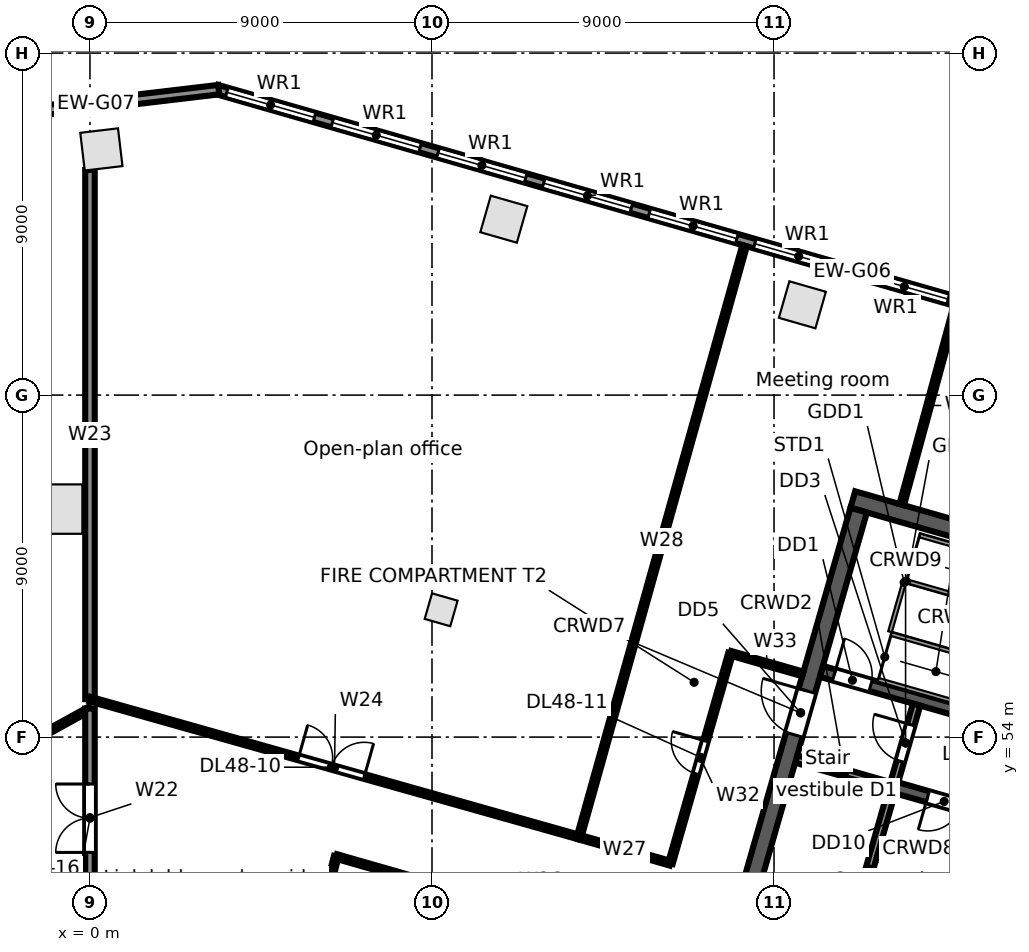
"""IFC4 building model, lengths in metres.
Left out: names, types, materials, properties, quantities, classifications, styles, units other than length and angle.
Written with IfcOpenShell. Run it as: python <this file> out.ifc"""

import sys

from ifc_helpers import new_model, si_unit, direction, frame, frame_2d, origin, origin_2d, place, context, subcontext, project, spatial, rectangle, extrude, element, fill, save


model = new_model("IFC4")
c1 = context("Model", 3, precision=1e-05, world=origin(), true_north=direction((0.0, 1.0)))
c2 = subcontext(c1, "Body", "Model", "MODEL_VIEW")
j1 = project(units=[si_unit("LENGTHUNIT", "METRE"), si_unit("PLANEANGLEUNIT", "RADIAN")], contexts=[c1])
p1 = place(None, origin())
s1 = spatial("IfcSite", under=j1, at=p1, CompositionType="ELEMENT")
p2 = place(p1, origin())
s2 = spatial("IfcBuilding", under=s1, at=p2, CompositionType="ELEMENT")
p3 = place(p2, frame((0.0, 0.0, 223.1)))
s3 = spatial("IfcBuildingStorey", under=s2, at=p3, CompositionType="ELEMENT", Elevation=223.1)
for number, where, z_axis, x_axis in (
    (1, (18.746, 65.376, 0.0), (0.0, 0.0, 1.0), (-0.961, 0.276, 0.0)),
    (2, (10.89, 67.629, 0.0), (0.0, 0.0, 1.0), (-0.961, 0.276, 0.0)),
    (3, (0.3, 69.464, 0.0), (0.0, 0.0, 1.0), (-0.993, -0.118, 0.0)),
):
    element("IfcColumn", number, at=place(p3, frame(where, z_axis=z_axis, x_axis=x_axis)), inside=s3, PredefinedType="COLUMN", context=c2, shape_type="SweptSolid", body=[
        extrude(rectangle(XDim=1.0, YDim=1.0, at=origin_2d()), origin(), (0.0, 0.0, 1.0), 3.9),
    ])
p4 = place(p3, frame((-0.85, 60.0, 0.0), z_axis=(0.0, 0.0, 1.0), x_axis=(0.0, 1.0, 0.0)))
e4 = element("IfcColumn", 4, at=p4, inside=s3, PredefinedType="COLUMN", context=c2, shape_type="SweptSolid", body=[
    extrude(rectangle(XDim=1.3, YDim=1.3, at=origin_2d()), origin(), (0.0, 0.0, 1.0), 3.9),
])
p5 = place(p3, frame((9.241, 57.35, 0.0), z_axis=(0.0, 0.0, 1.0), x_axis=(0.961261695938, -0.275637355817, 0.0)))
e5 = element("IfcColumn", 5, at=p5, inside=s3, PredefinedType="COLUMN", context=c2, shape_type="SweptSolid", body=[
    extrude(rectangle(XDim=0.7, YDim=0.7, at=origin_2d()), origin(), (0.0, 0.0, 1.0), 3.9),
])
p6 = place(p3, frame((3.34, 71.042, 0.0), z_axis=(0.0, 0.0, 1.0), x_axis=(0.96126179431, -0.275637012753, 0.0)))
e6 = element("IfcWall", 6, at=p6, inside=s3, PredefinedType="STANDARD", context=c2, shape_type="SweptSolid", body=[
    extrude(rectangle(XDim=34.779, YDim=0.25, at=frame_2d((17.39, 0.0))), origin(), (0.0, 0.0, 1.0), 3.62),
])
p7 = place(p6, frame((32.071, 0.0, 0.8)))
e7 = element("IfcOpeningElement", 7, at=p7, cuts=e6, PredefinedType="OPENING", context=c2, shape_type="SweptSolid", body=[
    extrude(rectangle(XDim=2.4, YDim=2.2, at=frame_2d((1.2, 1.1))), frame((0.0, 0.135, 0.0), z_axis=(0.0, -1.0, 0.0), x_axis=(1.0, 0.0, 0.0)), (0.0, 0.0, 1.0), 0.27),
])
p8 = place(p6, frame((29.18, 0.0, 0.8)))
e8 = element("IfcOpeningElement", 8, at=p8, cuts=e6, PredefinedType="OPENING", context=c2, shape_type="SweptSolid", body=[
    extrude(rectangle(XDim=2.4, YDim=2.2, at=frame_2d((1.2, 1.1))), frame((0.0, 0.135, 0.0), z_axis=(0.0, -1.0, 0.0), x_axis=(1.0, 0.0, 0.0)), (0.0, 0.0, 1.0), 0.27),
])
p9 = place(p6, frame((26.289, 0.0, 0.8)))
e9 = element("IfcOpeningElement", 9, at=p9, cuts=e6, PredefinedType="OPENING", context=c2, shape_type="SweptSolid", body=[
    extrude(rectangle(XDim=2.4, YDim=2.2, at=frame_2d((1.2, 1.1))), frame((0.0, 0.135, 0.0), z_axis=(0.0, -1.0, 0.0), x_axis=(1.0, 0.0, 0.0)), (0.0, 0.0, 1.0), 0.27),
])
p10 = place(p6, frame((23.398, 0.0, 0.8)))
e10 = element("IfcOpeningElement", 10, at=p10, cuts=e6, PredefinedType="OPENING", context=c2, shape_type="SweptSolid", body=[
    extrude(rectangle(XDim=2.4, YDim=2.2, at=frame_2d((1.2, 1.1))), frame((0.0, 0.135, 0.0), z_axis=(0.0, -1.0, 0.0), x_axis=(1.0, 0.0, 0.0)), (0.0, 0.0, 1.0), 0.27),
])
p11 = place(p6, frame((20.508, 0.0, 0.8)))
e11 = element("IfcOpeningElement", 11, at=p11, cuts=e6, PredefinedType="OPENING", context=c2, shape_type="SweptSolid", body=[
    extrude(rectangle(XDim=2.4, YDim=2.2, at=frame_2d((1.2, 1.1))), frame((0.0, 0.135, 0.0), z_axis=(0.0, -1.0, 0.0), x_axis=(1.0, 0.0, 0.0)), (0.0, 0.0, 1.0), 0.27),
])
p12 = place(p6, frame((17.616, 0.0, 0.8)))
e12 = element("IfcOpeningElement", 12, at=p12, cuts=e6, PredefinedType="OPENING", context=c2, shape_type="SweptSolid", body=[
    extrude(rectangle(XDim=2.4, YDim=2.2, at=frame_2d((1.2, 1.1))), frame((0.0, 0.135, 0.0), z_axis=(0.0, -1.0, 0.0), x_axis=(1.0, 0.0, 0.0)), (0.0, 0.0, 1.0), 0.27),
])
p13 = place(p6, frame((14.726, 0.0, 0.8)))
e13 = element("IfcOpeningElement", 13, at=p13, cuts=e6, PredefinedType="OPENING", context=c2, shape_type="SweptSolid", body=[
    extrude(rectangle(XDim=2.4, YDim=2.2, at=frame_2d((1.2, 1.1))), frame((0.0, 0.135, 0.0), z_axis=(0.0, -1.0, 0.0), x_axis=(1.0, 0.0, 0.0)), (0.0, 0.0, 1.0), 0.27),
])
p14 = place(p6, frame((11.834, 0.0, 0.8)))
e14 = element("IfcOpeningElement", 14, at=p14, cuts=e6, PredefinedType="OPENING", context=c2, shape_type="SweptSolid", body=[
    extrude(rectangle(XDim=2.4, YDim=2.2, at=frame_2d((1.2, 1.1))), frame((0.0, 0.135, 0.0), z_axis=(0.0, -1.0, 0.0), x_axis=(1.0, 0.0, 0.0)), (0.0, 0.0, 1.0), 0.27),
])
p15 = place(p6, frame((8.944, 0.0, 0.8)))
e15 = element("IfcOpeningElement", 15, at=p15, cuts=e6, PredefinedType="OPENING", context=c2, shape_type="SweptSolid", body=[
    extrude(rectangle(XDim=2.4, YDim=2.2, at=frame_2d((1.2, 1.1))), frame((0.0, 0.135, 0.0), z_axis=(0.0, -1.0, 0.0), x_axis=(1.0, 0.0, 0.0)), (0.0, 0.0, 1.0), 0.27),
])
p16 = place(p6, frame((6.052, 0.0, 0.8)))
e16 = element("IfcOpeningElement", 16, at=p16, cuts=e6, PredefinedType="OPENING", context=c2, shape_type="SweptSolid", body=[
    extrude(rectangle(XDim=2.4, YDim=2.2, at=frame_2d((1.2, 1.1))), frame((0.0, 0.135, 0.0), z_axis=(0.0, -1.0, 0.0), x_axis=(1.0, 0.0, 0.0)), (0.0, 0.0, 1.0), 0.27),
])
p17 = place(p6, frame((3.162, 0.0, 0.8)))
e17 = element("IfcOpeningElement", 17, at=p17, cuts=e6, PredefinedType="OPENING", context=c2, shape_type="SweptSolid", body=[
    extrude(rectangle(XDim=2.4, YDim=2.2, at=frame_2d((1.2, 1.1))), frame((0.0, 0.135, 0.0), z_axis=(0.0, -1.0, 0.0), x_axis=(1.0, 0.0, 0.0)), (0.0, 0.0, 1.0), 0.27),
])
p18 = place(p6, frame((0.271, 0.0, 0.8)))
e18 = element("IfcOpeningElement", 18, at=p18, cuts=e6, PredefinedType="OPENING", context=c2, shape_type="SweptSolid", body=[
    extrude(rectangle(XDim=2.4, YDim=2.2, at=frame_2d((1.2, 1.1))), frame((0.0, 0.135, 0.0), z_axis=(0.0, -1.0, 0.0), x_axis=(1.0, 0.0, 0.0)), (0.0, 0.0, 1.0), 0.27),
])
p19 = place(p3, frame((-3.071, 70.273, 0.0), z_axis=(0.0, 0.0, 1.0), x_axis=(0.993064524962, 0.11757061394, 0.0)))
e19 = element("IfcWall", 19, at=p19, inside=s3, PredefinedType="STANDARD", context=c2, shape_type="SweptSolid", body=[
    extrude(rectangle(XDim=6.506, YDim=0.25, at=frame_2d((3.253, 0.0))), origin(), (0.0, 0.0, 1.0), 3.62),
])
p20 = place(p3, frame((18.583, 53.423, 0.0), z_axis=(0.0, 0.0, 1.0), x_axis=(0.961259287968, -0.275645753268, 0.0)))
e20 = element("IfcWall", 20, at=p20, inside=s3, PredefinedType="SOLIDWALL", context=c2, shape_type="SweptSolid", body=[
    extrude(rectangle(XDim=2.65, YDim=0.2, at=frame_2d((1.325, 0.0))), origin(), (0.0, 0.0, 1.0), 3.62),
])
p21 = place(p3, frame((21.131, 52.692, 0.0), z_axis=(0.0, 0.0, 1.0), x_axis=(0.961261488075, -0.275638080722, 0.0)))
e21 = element("IfcWall", 21, at=p21, inside=s3, PredefinedType="SOLIDWALL", context=c2, shape_type="SweptSolid", body=[
    extrude(rectangle(XDim=5.45, YDim=0.3, at=frame_2d((2.725, 0.0))), origin(), (0.0, 0.0, 1.0), 3.62),
])
p22 = place(p21, frame((0.95, 0.0, 0.0)))
e22 = element("IfcOpeningElement", 22, at=p22, cuts=e21, PredefinedType="OPENING", context=c2, shape_type="SweptSolid", body=[
    extrude(rectangle(XDim=0.9, YDim=2.1, at=frame_2d((0.45, 1.05))), frame((0.0, 0.16, 0.0), z_axis=(0.0, -1.0, 0.0), x_axis=(1.0, 0.0, 0.0)), (0.0, 0.0, 1.0), 0.32),
])
p23 = place(p21, frame((3.75, 0.0, 0.0)))
e23 = element("IfcOpeningElement", 23, at=p23, cuts=e21, PredefinedType="OPENING", context=c2, shape_type="SweptSolid", body=[
    extrude(rectangle(XDim=0.9, YDim=2.1, at=frame_2d((0.45, 1.05))), frame((0.0, 0.16, 0.0), z_axis=(0.0, -1.0, 0.0), x_axis=(1.0, 0.0, 0.0)), (0.0, 0.0, 1.0), 0.32),
])
p24 = place(p3, frame((19.245, 55.73, 0.0), z_axis=(0.0, 0.0, 1.0), x_axis=(0.961263007877, -0.275632780503, 0.0)))
e24 = element("IfcWall", 24, at=p24, inside=s3, PredefinedType="SOLIDWALL", context=c2, shape_type="SweptSolid", body=[
    extrude(rectangle(XDim=7.25, YDim=0.3, at=frame_2d((3.625, 0.0))), origin(), (0.0, 0.0, 1.0), 3.62),
])
p25 = place(p24, frame((0.35, 0.0, 0.0)))
e25 = element("IfcOpeningElement", 25, at=p25, cuts=e24, PredefinedType="OPENING", context=c2, shape_type="SweptSolid", body=[
    extrude(rectangle(XDim=1.0, YDim=2.1, at=frame_2d((0.5, 1.05))), frame((0.0, 0.16, 0.0), z_axis=(0.0, -1.0, 0.0), x_axis=(1.0, 0.0, 0.0)), (0.0, 0.0, 1.0), 0.32),
])
p26 = place(p3, frame((20.073, 60.252, 0.0), z_axis=(0.0, 0.0, 1.0), x_axis=(0.96126248289, -0.275634611374, 0.0)))
e26 = element("IfcWall", 26, at=p26, inside=s3, PredefinedType="SOLIDWALL", context=c2, shape_type="SweptSolid", body=[
    extrude(rectangle(XDim=9.0, YDim=0.45, at=frame_2d((4.5, 0.0))), origin(), (0.0, 0.0, 1.0), 3.62),
])
p27 = place(p3, frame((17.168, 49.303, 0.0), z_axis=(0.0, 0.0, 1.0), x_axis=(0.275638974822, 0.961261231695, 0.0)))
e27 = element("IfcWall", 27, at=p27, inside=s3, PredefinedType="SOLIDWALL", context=c2, shape_type="SweptSolid", body=[
    extrude(rectangle(XDim=11.1, YDim=0.45, at=frame_2d((5.55, 0.0))), origin(), (0.0, 0.0, 1.0), 3.62),
])
p28 = place(p27, frame((4.95, 0.0, 0.0)))
e28 = element("IfcOpeningElement", 28, at=p28, cuts=e27, PredefinedType="OPENING", context=c2, shape_type="SweptSolid", body=[
    extrude(rectangle(XDim=1.2, YDim=2.1, at=frame_2d((0.6, 1.05))), frame((0.0, 0.235, 0.0), z_axis=(0.0, -1.0, 0.0), x_axis=(1.0, 0.0, 0.0)), (0.0, 0.0, 1.0), 0.47),
])
p29 = place(p3, frame((19.932, 48.511, 0.0), z_axis=(0.0, 0.0, 1.0), x_axis=(0.275642273411, 0.961260285827, 0.0)))
e29 = element("IfcWall", 29, at=p29, inside=s3, PredefinedType="SOLIDWALL", context=c2, shape_type="SweptSolid", body=[
    extrude(rectangle(XDim=4.2, YDim=0.2, at=frame_2d((2.1, 0.0))), origin(), (0.0, 0.0, 1.0), 3.62),
])
p30 = place(p3, frame((21.172, 52.837, 0.0), z_axis=(0.0, 0.0, 1.0), x_axis=(0.275657676022, 0.961255868981, 0.0)))
e30 = element("IfcWall", 30, at=p30, inside=s3, PredefinedType="PARTITIONING", context=c2, shape_type="SweptSolid", body=[
    extrude(rectangle(XDim=2.1, YDim=0.2, at=frame_2d((1.05, 0.0))), origin(), (0.0, 0.0, 1.0), 3.62),
])
p31 = place(p30, frame((0.55, 0.0, 0.0)))
e31 = element("IfcOpeningElement", 31, at=p31, cuts=e30, PredefinedType="OPENING", context=c2, shape_type="SweptSolid", body=[
    extrude(rectangle(XDim=1.0, YDim=2.1, at=frame_2d((0.5, 1.05))), frame((0.0, 0.11, 0.0), z_axis=(0.0, -1.0, 0.0), x_axis=(1.0, 0.0, 0.0)), (0.0, 0.0, 1.0), 0.22),
])
p32 = place(p3, frame((22.623, 47.739, 0.0), z_axis=(0.0, 0.0, 1.0), x_axis=(0.275642273411, 0.961260285827, 0.0)))
e32 = element("IfcWall", 32, at=p32, inside=s3, PredefinedType="PARTITIONING", context=c2, shape_type="SweptSolid", body=[
    extrude(rectangle(XDim=4.2, YDim=0.2, at=frame_2d((2.1, 0.0))), origin(), (0.0, 0.0, 1.0), 3.62),
])
p33 = place(p3, frame((-6.053, 51.405, 0.0), z_axis=(0.0, 0.0, 1.0), x_axis=(0.875247434681, 0.483675436718, 0.0)))
e33 = element("IfcWall", 33, at=p33, inside=s3, PredefinedType="PARTITIONING", context=c2, shape_type="SweptSolid", body=[
    extrude(rectangle(XDim=6.916, YDim=0.125, at=frame_2d((3.458, 0.0))), origin(), (0.0, 0.0, 1.0), 2.8),
])
p34 = place(p33, frame((2.45, 0.0, 0.0)))
e34 = element("IfcOpeningElement", 34, at=p34, cuts=e33, PredefinedType="OPENING", context=c2, shape_type="SweptSolid", body=[
    extrude(rectangle(XDim=1.8, YDim=2.1, at=frame_2d((0.9, 1.05))), frame((0.0, 0.073, 0.0), z_axis=(0.0, -1.0, 0.0), x_axis=(1.0, 0.0, 0.0)), (0.0, 0.0, 1.0), 0.145),
])
p35 = place(p3, frame((0.0, 49.015, 0.0), z_axis=(0.0, 0.0, 1.0), x_axis=(0.0, 1.0, 0.0)))
e35 = element("IfcWall", 35, at=p35, inside=s3, PredefinedType="PARTITIONING", context=c2, shape_type="SweptSolid", body=[
    extrude(rectangle(XDim=5.735, YDim=0.25, at=frame_2d((2.868, 0.0))), origin(), (0.0, 0.0, 1.0), 3.62),
])
p36 = place(p35, frame((1.95, 0.0, 0.0)))
e36 = element("IfcOpeningElement", 36, at=p36, cuts=e35, PredefinedType="OPENING", context=c2, shape_type="SweptSolid", body=[
    extrude(rectangle(XDim=1.8, YDim=2.1, at=frame_2d((0.9, 1.05))), frame((0.0, 0.135, 0.0), z_axis=(0.0, -1.0, 0.0), x_axis=(1.0, 0.0, 0.0)), (0.0, 0.0, 1.0), 0.27),
])
p37 = place(p3, frame((0.0, 55.0, 0.0), z_axis=(0.0, 0.0, 1.0), x_axis=(0.0, 1.0, 0.0)))
e37 = element("IfcWall", 37, at=p37, inside=s3, PredefinedType="PARTITIONING", context=c2, shape_type="SweptSolid", body=[
    extrude(rectangle(XDim=13.925, YDim=0.25, at=frame_2d((6.962, 0.0))), origin(), (0.0, 0.0, 1.0), 2.8),
])
p38 = place(p3, frame((0.0, 55.0, 0.0), z_axis=(0.0, 0.0, 1.0), x_axis=(0.962402937884, -0.271625818271, 0.0)))
e38 = element("IfcWall", 38, at=p38, inside=s3, PredefinedType="PARTITIONING", context=c2, shape_type="SweptSolid", body=[
    extrude(rectangle(XDim=13.372, YDim=0.125, at=frame_2d((6.686, 0.0))), origin(), (0.0, 0.0, 1.0), 2.8),
])
p39 = place(p38, frame((5.7, 0.0, 0.0)))
e39 = element("IfcOpeningElement", 39, at=p39, cuts=e38, PredefinedType="OPENING", context=c2, shape_type="SweptSolid", body=[
    extrude(rectangle(XDim=1.8, YDim=2.1, at=frame_2d((0.9, 1.05))), frame((0.0, 0.073, 0.0), z_axis=(0.0, -1.0, 0.0), x_axis=(1.0, 0.0, 0.0)), (0.0, 0.0, 1.0), 0.145),
])
p40 = place(p3, frame((5.364, 46.592, 0.0), z_axis=(0.0, 0.0, 1.0), x_axis=(0.253446952203, 0.967349286669, 0.0)))
e40 = element("IfcWall", 40, at=p40, inside=s3, PredefinedType="PARTITIONING", context=c2, shape_type="SweptSolid", body=[
    extrude(rectangle(XDim=4.411, YDim=0.125, at=frame_2d((2.206, 0.0))), origin(), (0.0, 0.0, 1.0), 2.988),
])
p41 = place(p3, frame((6.482, 50.859, 0.0), z_axis=(0.0, 0.0, 1.0), x_axis=(0.961261196169, -0.275639098713, 0.0)))
e41 = element("IfcWall", 41, at=p41, inside=s3, PredefinedType="PARTITIONING", context=c2, shape_type="SweptSolid", body=[
    extrude(rectangle(XDim=8.5, YDim=0.125, at=frame_2d((4.25, 0.0))), origin(), (0.0, 0.0, 1.0), 2.8),
])
p42 = place(p41, frame((3.7, 0.0, 0.0)))
e42 = element("IfcOpeningElement", 42, at=p42, cuts=e41, PredefinedType="OPENING", context=c2, shape_type="SweptSolid", body=[
    extrude(rectangle(XDim=0.9, YDim=2.1, at=frame_2d((0.45, 1.05))), frame((0.0, 0.073, 0.0), z_axis=(0.0, -1.0, 0.0), x_axis=(1.0, 0.0, 0.0)), (0.0, 0.0, 1.0), 0.145),
])
p43 = place(p3, frame((12.869, 51.368, 0.0), z_axis=(0.0, 0.0, 1.0), x_axis=(0.961302601161, -0.275494662382, 0.0)))
e43 = element("IfcWall", 43, at=p43, inside=s3, PredefinedType="PARTITIONING", context=c2, shape_type="SweptSolid", body=[
    extrude(rectangle(XDim=2.501, YDim=0.125, at=frame_2d((1.25, 0.0))), origin(), (0.0, 0.0, 1.0), 3.62),
])
p44 = place(p3, frame((12.869, 51.368, 0.0), z_axis=(0.0, 0.0, 1.0), x_axis=(0.269547555311, 0.962987079574, 0.0)))
e44 = element("IfcWall", 44, at=p44, inside=s3, PredefinedType="PARTITIONING", context=c2, shape_type="SweptSolid", body=[
    extrude(rectangle(XDim=16.161, YDim=0.125, at=frame_2d((8.081, 0.0))), origin(), (0.0, 0.0, 1.0), 2.792),
])
p45 = place(p3, frame((15.273, 50.679, 0.0), z_axis=(0.0, 0.0, 1.0), x_axis=(0.275494973205, 0.961302512084, 0.0)))
e45 = element("IfcWall", 45, at=p45, inside=s3, PredefinedType="PARTITIONING", context=c2, shape_type="SweptSolid", body=[
    extrude(rectangle(XDim=5.75, YDim=0.125, at=frame_2d((2.875, 0.0))), origin(), (0.0, 0.0, 1.0), 2.8),
])
p46 = place(p45, frame((2.45, 0.0, 0.0)))
e46 = element("IfcOpeningElement", 46, at=p46, cuts=e45, PredefinedType="OPENING", context=c2, shape_type="SweptSolid", body=[
    extrude(rectangle(XDim=0.9, YDim=2.1, at=frame_2d((0.45, 1.05))), frame((0.0, 0.073, 0.0), z_axis=(0.0, -1.0, 0.0), x_axis=(1.0, 0.0, 0.0)), (0.0, 0.0, 1.0), 0.145),
])
p47 = place(p3, frame((16.857, 56.206, 0.0), z_axis=(0.0, 0.0, 1.0), x_axis=(0.961383985066, -0.275210525341, 0.0)))
e47 = element("IfcWall", 47, at=p47, inside=s3, PredefinedType="PARTITIONING", context=c2, shape_type="SweptSolid", body=[
    extrude(rectangle(XDim=1.977, YDim=0.125, at=frame_2d((0.988, 0.0))), origin(), (0.0, 0.0, 1.0), 3.62),
])
p48 = place(p3, frame((21.36, 60.117, 0.0), z_axis=(0.0, 0.0, 1.0), x_axis=(0.263151767798, 0.964754449124, 0.0)))
e48 = element("IfcWall", 48, at=p48, inside=s3, PredefinedType="PARTITIONING", context=c2, shape_type="SweptSolid", body=[
    extrude(rectangle(XDim=5.411, YDim=0.125, at=frame_2d((2.705, 0.0))), origin(), (0.0, 0.0, 1.0), 3.0),
])
p49 = place(p12, origin())
e49 = element("IfcWindow", 49, at=p49, inside=s3, PartitioningType="SINGLE_PANEL", PredefinedType="WINDOW", context=c2, shape_type="SweptSolid", body=[
    extrude(rectangle(XDim=2.4, YDim=2.2, at=frame_2d((1.2, 1.1))), frame((0.0, 0.03, 0.0), z_axis=(0.0, -1.0, 0.0), x_axis=(1.0, 0.0, 0.0)), (0.0, 0.0, 1.0), 0.06),
])
fill(e12, e49)
p50 = place(p13, origin())
e50 = element("IfcWindow", 50, at=p50, inside=s3, PartitioningType="SINGLE_PANEL", PredefinedType="WINDOW", context=c2, shape_type="SweptSolid", body=[
    extrude(rectangle(XDim=2.4, YDim=2.2, at=frame_2d((1.2, 1.1))), frame((0.0, 0.03, 0.0), z_axis=(0.0, -1.0, 0.0), x_axis=(1.0, 0.0, 0.0)), (0.0, 0.0, 1.0), 0.06),
])
fill(e13, e50)
p51 = place(p14, origin())
e51 = element("IfcWindow", 51, at=p51, inside=s3, PartitioningType="SINGLE_PANEL", PredefinedType="WINDOW", context=c2, shape_type="SweptSolid", body=[
    extrude(rectangle(XDim=2.4, YDim=2.2, at=frame_2d((1.2, 1.1))), frame((0.0, 0.03, 0.0), z_axis=(0.0, -1.0, 0.0), x_axis=(1.0, 0.0, 0.0)), (0.0, 0.0, 1.0), 0.06),
])
fill(e14, e51)
p52 = place(p15, origin())
e52 = element("IfcWindow", 52, at=p52, inside=s3, PartitioningType="SINGLE_PANEL", PredefinedType="WINDOW", context=c2, shape_type="SweptSolid", body=[
    extrude(rectangle(XDim=2.4, YDim=2.2, at=frame_2d((1.2, 1.1))), frame((0.0, 0.03, 0.0), z_axis=(0.0, -1.0, 0.0), x_axis=(1.0, 0.0, 0.0)), (0.0, 0.0, 1.0), 0.06),
])
fill(e15, e52)
p53 = place(p16, origin())
e53 = element("IfcWindow", 53, at=p53, inside=s3, PartitioningType="SINGLE_PANEL", PredefinedType="WINDOW", context=c2, shape_type="SweptSolid", body=[
    extrude(rectangle(XDim=2.4, YDim=2.2, at=frame_2d((1.2, 1.1))), frame((0.0, 0.03, 0.0), z_axis=(0.0, -1.0, 0.0), x_axis=(1.0, 0.0, 0.0)), (0.0, 0.0, 1.0), 0.06),
])
fill(e16, e53)
p54 = place(p17, origin())
e54 = element("IfcWindow", 54, at=p54, inside=s3, PartitioningType="SINGLE_PANEL", PredefinedType="WINDOW", context=c2, shape_type="SweptSolid", body=[
    extrude(rectangle(XDim=2.4, YDim=2.2, at=frame_2d((1.2, 1.1))), frame((0.0, 0.03, 0.0), z_axis=(0.0, -1.0, 0.0), x_axis=(1.0, 0.0, 0.0)), (0.0, 0.0, 1.0), 0.06),
])
fill(e17, e54)
p55 = place(p18, origin())
e55 = element("IfcWindow", 55, at=p55, inside=s3, PartitioningType="SINGLE_PANEL", PredefinedType="WINDOW", context=c2, shape_type="SweptSolid", body=[
    extrude(rectangle(XDim=2.4, YDim=2.2, at=frame_2d((1.2, 1.1))), frame((0.0, 0.03, 0.0), z_axis=(0.0, -1.0, 0.0), x_axis=(1.0, 0.0, 0.0)), (0.0, 0.0, 1.0), 0.06),
])
fill(e18, e55)
p56 = place(p25, origin())
e56 = element("IfcDoor", 56, at=p56, inside=s3, OperationType="SINGLE_SWING_LEFT", PredefinedType="DOOR", context=c2, shape_type="SweptSolid", body=[
    extrude(rectangle(XDim=1.0, YDim=2.1, at=frame_2d((0.5, 1.05))), frame((0.0, 0.025, 0.0), z_axis=(0.0, -1.0, 0.0), x_axis=(1.0, 0.0, 0.0)), (0.0, 0.0, 1.0), 0.05),
])
fill(e25, e56)
p57 = place(p31, origin())
e57 = element("IfcDoor", 57, at=p57, inside=s3, OperationType="SINGLE_SWING_RIGHT", PredefinedType="DOOR", context=c2, shape_type="SweptSolid", body=[
    extrude(rectangle(XDim=1.0, YDim=2.1, at=frame_2d((0.5, 1.05))), frame((0.0, 0.025, 0.0), z_axis=(0.0, -1.0, 0.0), x_axis=(1.0, 0.0, 0.0)), (0.0, 0.0, 1.0), 0.05),
])
fill(e31, e57)
p58 = place(p28, origin())
e58 = element("IfcDoor", 58, at=p58, inside=s3, OperationType="SINGLE_SWING_RIGHT", PredefinedType="DOOR", context=c2, shape_type="SweptSolid", body=[
    extrude(rectangle(XDim=1.2, YDim=2.1, at=frame_2d((0.6, 1.05))), frame((0.0, 0.025, 0.0), z_axis=(0.0, -1.0, 0.0), x_axis=(1.0, 0.0, 0.0)), (0.0, 0.0, 1.0), 0.05),
])
fill(e28, e58)
p59 = place(p22, frame((0.9, 0.0, 0.0), z_axis=(0.0, 0.0, 1.0), x_axis=(-1.0, 0.0, 0.0)))
e59 = element("IfcDoor", 59, at=p59, inside=s3, OperationType="SINGLE_SWING_RIGHT", PredefinedType="DOOR", context=c2, shape_type="SweptSolid", body=[
    extrude(rectangle(XDim=0.9, YDim=2.1, at=frame_2d((0.45, 1.05))), frame((0.0, 0.025, 0.0), z_axis=(0.0, -1.0, 0.0), x_axis=(1.0, 0.0, 0.0)), (0.0, 0.0, 1.0), 0.05),
])
fill(e22, e59)
p60 = place(p39, origin())
e60 = element("IfcDoor", 60, at=p60, inside=s3, OperationType="DOUBLE_DOOR_SINGLE_SWING", PredefinedType="DOOR", context=c2, shape_type="SweptSolid", body=[
    extrude(rectangle(XDim=1.8, YDim=2.1, at=frame_2d((0.9, 1.05))), frame((0.0, 0.025, 0.0), z_axis=(0.0, -1.0, 0.0), x_axis=(1.0, 0.0, 0.0)), (0.0, 0.0, 1.0), 0.05),
])
fill(e39, e60)
p61 = place(p46, origin())
e61 = element("IfcDoor", 61, at=p61, inside=s3, OperationType="SINGLE_SWING_RIGHT", PredefinedType="DOOR", context=c2, shape_type="SweptSolid", body=[
    extrude(rectangle(XDim=0.9, YDim=2.1, at=frame_2d((0.45, 1.05))), frame((0.0, 0.025, 0.0), z_axis=(0.0, -1.0, 0.0), x_axis=(1.0, 0.0, 0.0)), (0.0, 0.0, 1.0), 0.05),
])
fill(e46, e61)
p62 = place(p36, origin())
e62 = element("IfcDoor", 62, at=p62, inside=s3, OperationType="DOUBLE_DOOR_SINGLE_SWING", PredefinedType="DOOR", context=c2, shape_type="SweptSolid", body=[
    extrude(rectangle(XDim=1.8, YDim=2.1, at=frame_2d((0.9, 1.05))), frame((0.0, 0.025, 0.0), z_axis=(0.0, -1.0, 0.0), x_axis=(1.0, 0.0, 0.0)), (0.0, 0.0, 1.0), 0.05),
])
fill(e36, e62)
save(model, sys.argv[1])
